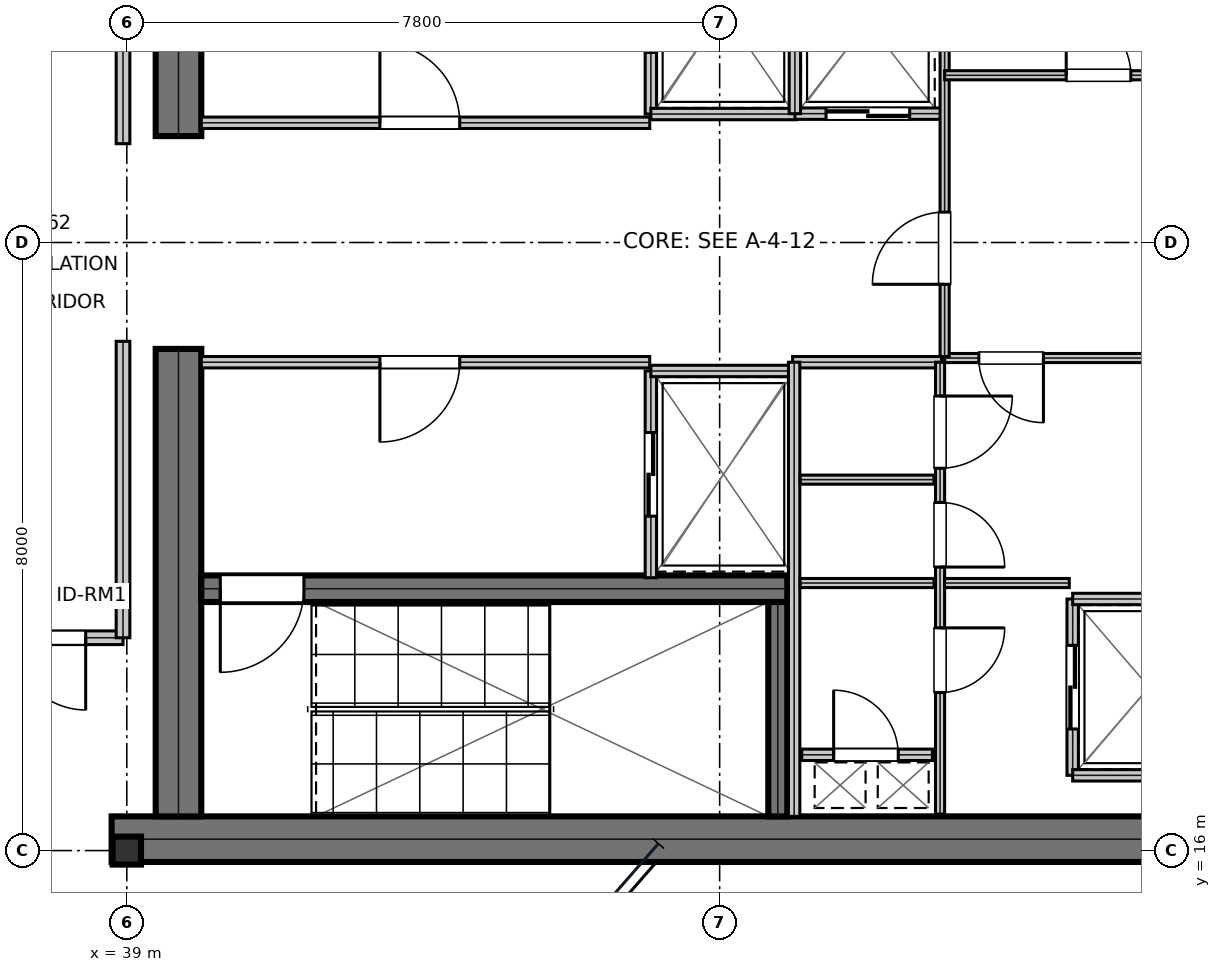
"""IFC4 building model, lengths in metres.
Left out: names, types, materials, properties, quantities, classifications, styles, units other than length and angle.
Written with IfcOpenShell. Run it as: python <this file> out.ifc"""

import sys

from ifc_helpers import new_model, si_unit, direction, frame, frame_2d, origin, origin_2d, place, context, subcontext, project, spatial, rectangle, i_section, extrude, element, fill, save


model = new_model("IFC4")
c1 = context("Model", 3, precision=1e-05, world=origin(), true_north=direction((0.0, 1.0)))
c2 = subcontext(c1, "Body", "Model", "MODEL_VIEW")
j1 = project(units=[si_unit("LENGTHUNIT", "METRE"), si_unit("PLANEANGLEUNIT", "RADIAN")], contexts=[c1])
p1 = place(None, origin())
s1 = spatial("IfcSite", under=j1, at=p1, CompositionType="ELEMENT")
p2 = place(p1, origin())
s2 = spatial("IfcBuilding", under=s1, at=p2, CompositionType="ELEMENT")
p3 = place(p2, frame((0.0, 0.0, 266.85)))
s3 = spatial("IfcBuildingStorey", under=s2, at=p3, CompositionType="ELEMENT", Elevation=266.85)
p4 = place(p3, frame((38.8, 16.15, 0.0), z_axis=(0.0, 0.0, 1.0), x_axis=(1.0, 0.0, 0.0)))
e1 = element("IfcWall", 1, at=p4, inside=s3, PredefinedType="SHEAR", context=c2, shape_type="SweptSolid", body=[
    extrude(rectangle(XDim=16.0, YDim=0.6, at=frame_2d((8.0, 0.0))), origin(), (0.0, 0.0, 1.0), 3.81),
])
for number, where, z_axis, x_axis in (
    (2, (39.68, 16.45, 0.0), (0.0, 0.0, 1.0), (0.0, 1.0, 0.0)),
    (3, (39.68, 25.4, 0.0), (0.0, 0.0, 1.0), (0.0, 1.0, 0.0)),
):
    element("IfcWall", number, at=place(p3, frame(where, z_axis=z_axis, x_axis=x_axis)), inside=s3, PredefinedType="SHEAR", context=c2, shape_type="SweptSolid", body=[
        extrude(rectangle(XDim=6.15, YDim=0.6, at=frame_2d((3.075, 0.0))), origin(), (0.0, 0.0, 1.0), 3.81),
    ])
p5 = place(p3, frame((39.98, 19.445, 0.0), z_axis=(0.0, 0.0, 1.0), x_axis=(1.0, 0.0, 0.0)))
e4 = element("IfcWall", 4, at=p5, inside=s3, PredefinedType="SHEAR", context=c2, shape_type="SweptSolid", body=[
    extrude(rectangle(XDim=7.71, YDim=0.35, at=frame_2d((3.855, 0.0))), origin(), (0.0, 0.0, 1.0), 3.81),
])
p6 = place(p5, frame((0.25, 0.0, 0.0)))
e5 = element("IfcOpeningElement", 5, at=p6, cuts=e4, PredefinedType="OPENING", context=c2, shape_type="SweptSolid", body=[
    extrude(rectangle(XDim=1.1, YDim=2.15, at=frame_2d((0.55, 1.075))), frame((0.0, 0.185, 0.0), z_axis=(0.0, -1.0, 0.0), x_axis=(1.0, 0.0, 0.0)), (0.0, 0.0, 1.0), 0.37),
])
p7 = place(p3, frame((47.565, 16.45, 0.0), z_axis=(0.0, 0.0, 1.0), x_axis=(0.0, 1.0, 0.0)))
e6 = element("IfcWall", 6, at=p7, inside=s3, PredefinedType="SHEAR", context=c2, shape_type="SweptSolid", body=[
    extrude(rectangle(XDim=2.82, YDim=0.25, at=frame_2d((1.41, 0.0))), origin(), (0.0, 0.0, 1.0), 3.81),
])
p8 = place(p3, frame((39.0, 16.0, 0.0), z_axis=(0.0, 0.0, 1.0), x_axis=(1.0, 0.0, 0.0)))
e7 = element("IfcColumn", 7, at=p8, inside=s3, PredefinedType="COLUMN", context=c2, shape_type="SweptSolid", body=[
    extrude(i_section(OverallWidth=0.373, OverallDepth=0.368, WebThickness=0.015, FlangeThickness=0.024, at=origin_2d()), origin(), (0.0, 0.0, 1.0), 4.044),
])
p9 = place(p3, frame((39.98, 25.575, 0.0), z_axis=(0.0, 0.0, 1.0), x_axis=(1.0, 0.0, 0.0)))
e8 = element("IfcWall", 8, at=p9, inside=s3, PredefinedType="PARTITIONING", context=c2, shape_type="SweptSolid", body=[
    extrude(rectangle(XDim=5.9, YDim=0.15, at=frame_2d((2.95, 0.0))), origin(), (0.0, 0.0, 1.0), 3.81),
])
p10 = place(p9, frame((2.35, 0.0, 0.0)))
e9 = element("IfcOpeningElement", 9, at=p10, cuts=e8, PredefinedType="OPENING", context=c2, shape_type="SweptSolid", body=[
    extrude(rectangle(XDim=1.05, YDim=2.15, at=frame_2d((0.525, 1.075))), frame((0.0, 0.085, 0.0), z_axis=(0.0, -1.0, 0.0), x_axis=(1.0, 0.0, 0.0)), (0.0, 0.0, 1.0), 0.17),
])
p11 = place(p3, frame((39.98, 22.425, 0.0), z_axis=(0.0, 0.0, 1.0), x_axis=(1.0, 0.0, 0.0)))
e10 = element("IfcWall", 10, at=p11, inside=s3, PredefinedType="PARTITIONING", context=c2, shape_type="SweptSolid", body=[
    extrude(rectangle(XDim=5.9, YDim=0.15, at=frame_2d((2.95, 0.0))), origin(), (0.0, 0.0, 1.0), 3.81),
])
p12 = place(p11, frame((2.35, 0.0, 0.0)))
e11 = element("IfcOpeningElement", 11, at=p12, cuts=e10, PredefinedType="OPENING", context=c2, shape_type="SweptSolid", body=[
    extrude(rectangle(XDim=1.05, YDim=2.15, at=frame_2d((0.525, 1.075))), frame((0.0, 0.085, 0.0), z_axis=(0.0, -1.0, 0.0), x_axis=(1.0, 0.0, 0.0)), (0.0, 0.0, 1.0), 0.17),
])
p13 = place(p3, frame((45.895, 25.69, 0.0), z_axis=(0.0, 0.0, 1.0), x_axis=(0.0, 1.0, 0.0)))
e12 = element("IfcWall", 12, at=p13, inside=s3, PredefinedType="PARTITIONING", context=c2, shape_type="SweptSolid", body=[
    extrude(rectangle(XDim=2.72, YDim=0.15, at=frame_2d((1.36, 0.0))), origin(), (0.0, 0.0, 1.0), 3.81),
])
p14 = place(p13, frame((0.81, 0.0, 0.0)))
e13 = element("IfcOpeningElement", 13, at=p14, cuts=e12, PredefinedType="OPENING", context=c2, shape_type="SweptSolid", body=[
    extrude(rectangle(XDim=1.1, YDim=2.15, at=frame_2d((0.55, 1.075))), frame((0.0, 0.085, 0.0), z_axis=(0.0, -1.0, 0.0), x_axis=(1.0, 0.0, 0.0)), (0.0, 0.0, 1.0), 0.17),
])
p15 = place(p3, frame((45.895, 25.69, 0.0), z_axis=(0.0, 0.0, 1.0), x_axis=(1.0, 0.0, 0.0)))
e14 = element("IfcWall", 14, at=p15, inside=s3, PredefinedType="PARTITIONING", context=c2, shape_type="SweptSolid", body=[
    extrude(rectangle(XDim=1.915, YDim=0.15, at=frame_2d((0.958, 0.0))), origin(), (0.0, 0.0, 1.0), 3.81),
])
p16 = place(p3, frame((45.895, 19.59, 0.0), z_axis=(0.0, 0.0, 1.0), x_axis=(0.0, 1.0, 0.0)))
e15 = element("IfcWall", 15, at=p16, inside=s3, PredefinedType="PARTITIONING", context=c2, shape_type="SweptSolid", body=[
    extrude(rectangle(XDim=2.72, YDim=0.15, at=frame_2d((1.36, 0.0))), origin(), (0.0, 0.0, 1.0), 3.81),
])
p17 = place(p16, frame((0.81, 0.0, 0.0)))
e16 = element("IfcOpeningElement", 16, at=p17, cuts=e15, PredefinedType="OPENING", context=c2, shape_type="SweptSolid", body=[
    extrude(rectangle(XDim=1.1, YDim=2.15, at=frame_2d((0.55, 1.075))), frame((0.0, 0.085, 0.0), z_axis=(0.0, -1.0, 0.0), x_axis=(1.0, 0.0, 0.0)), (0.0, 0.0, 1.0), 0.17),
])
p18 = place(p3, frame((45.895, 22.31, 0.0), z_axis=(0.0, 0.0, 1.0), x_axis=(1.0, 0.0, 0.0)))
e17 = element("IfcWall", 17, at=p18, inside=s3, PredefinedType="PARTITIONING", context=c2, shape_type="SweptSolid", body=[
    extrude(rectangle(XDim=1.915, YDim=0.15, at=frame_2d((0.958, 0.0))), origin(), (0.0, 0.0, 1.0), 3.81),
])
p19 = place(p3, frame((47.79, 25.695, 0.0), z_axis=(0.0, 0.0, 1.0), x_axis=(1.0, 0.0, 0.0)))
e18 = element("IfcWall", 18, at=p19, inside=s3, PredefinedType="PARTITIONING", context=c2, shape_type="SweptSolid", body=[
    extrude(rectangle(XDim=1.92, YDim=0.15, at=frame_2d((0.96, 0.0))), origin(), (0.0, 0.0, 1.0), 3.81),
])
p20 = place(p19, frame((0.41, 0.0, 0.0)))
e19 = element("IfcOpeningElement", 19, at=p20, cuts=e18, PredefinedType="OPENING", context=c2, shape_type="SweptSolid", body=[
    extrude(rectangle(XDim=1.1, YDim=2.15, at=frame_2d((0.55, 1.075))), frame((0.0, 0.085, 0.0), z_axis=(0.0, -1.0, 0.0), x_axis=(1.0, 0.0, 0.0)), (0.0, 0.0, 1.0), 0.17),
])
p21 = place(p3, frame((47.79, 25.695, 0.0), z_axis=(0.0, 0.0, 1.0), x_axis=(0.0, 1.0, 0.0)))
e20 = element("IfcWall", 20, at=p21, inside=s3, PredefinedType="PARTITIONING", context=c2, shape_type="SweptSolid", body=[
    extrude(rectangle(XDim=2.415, YDim=0.15, at=frame_2d((1.208, 0.0))), origin(), (0.0, 0.0, 1.0), 3.81),
])
p22 = place(p3, frame((51.445, 16.99, 0.0), z_axis=(0.0, 0.0, 1.0), x_axis=(0.0, 1.0, 0.0)))
e21 = element("IfcWall", 21, at=p22, inside=s3, PredefinedType="PARTITIONING", context=c2, shape_type="SweptSolid", body=[
    extrude(rectangle(XDim=2.32, YDim=0.15, at=frame_2d((1.16, 0.0))), origin(), (0.0, 0.0, 1.0), 3.81),
])
p23 = place(p22, frame((0.61, 0.0, 0.0)))
e22 = element("IfcOpeningElement", 22, at=p23, cuts=e21, PredefinedType="OPENING", context=c2, shape_type="SweptSolid", body=[
    extrude(rectangle(XDim=1.1, YDim=2.15, at=frame_2d((0.55, 1.075))), frame((0.0, 0.085, 0.0), z_axis=(0.0, -1.0, 0.0), x_axis=(1.0, 0.0, 0.0)), (0.0, 0.0, 1.0), 0.17),
])
for number, where, z_axis, x_axis in (
    (23, (51.445, 16.99, 0.0), (0.0, 0.0, 1.0), (1.0, 0.0, 0.0)),
    (24, (51.445, 19.31, 0.0), (0.0, 0.0, 1.0), (1.0, 0.0, 0.0)),
):
    element("IfcWall", number, at=place(p3, frame(where, z_axis=z_axis, x_axis=x_axis)), inside=s3, PredefinedType="PARTITIONING", context=c2, shape_type="SweptSolid", body=[
        extrude(rectangle(XDim=2.015, YDim=0.15, at=frame_2d((1.007, 0.0))), origin(), (0.0, 0.0, 1.0), 3.81),
    ])
p24 = place(p3, frame((47.88, 17.26, 0.0), z_axis=(0.0, 0.0, 1.0), x_axis=(1.0, 0.0, 0.0)))
e25 = element("IfcWall", 25, at=p24, inside=s3, PredefinedType="PARTITIONING", context=c2, shape_type="SweptSolid", body=[
    extrude(rectangle(XDim=1.72, YDim=0.15, at=frame_2d((0.86, 0.0))), origin(), (0.0, 0.0, 1.0), 3.81),
])
p25 = place(p24, frame((0.42, 0.0, 0.0)))
e26 = element("IfcOpeningElement", 26, at=p25, cuts=e25, PredefinedType="OPENING", context=c2, shape_type="SweptSolid", body=[
    extrude(rectangle(XDim=0.85, YDim=2.15, at=frame_2d((0.425, 1.075))), frame((0.0, 0.085, 0.0), z_axis=(0.0, -1.0, 0.0), x_axis=(1.0, 0.0, 0.0)), (0.0, 0.0, 1.0), 0.17),
])
p26 = place(p3, frame((47.76, 22.425, 0.0), z_axis=(0.0, 0.0, 1.0), x_axis=(1.0, 0.0, 0.0)))
e27 = element("IfcWall", 27, at=p26, inside=s3, PredefinedType="PARTITIONING", context=c2, shape_type="SweptSolid", body=[
    extrude(rectangle(XDim=1.96, YDim=0.15, at=frame_2d((0.98, 0.0))), origin(), (0.0, 0.0, 1.0), 3.81),
])
p27 = place(p3, frame((47.78, 16.45, 0.0), z_axis=(0.0, 0.0, 1.0), x_axis=(0.0, 1.0, 0.0)))
e28 = element("IfcWall", 28, at=p27, inside=s3, PredefinedType="PARTITIONING", context=c2, shape_type="SweptSolid", body=[
    extrude(rectangle(XDim=5.975, YDim=0.15, at=frame_2d((2.988, 0.0))), origin(), (0.0, 0.0, 1.0), 3.81),
])
for number, where, z_axis, x_axis in (
    (29, (47.86, 19.52, 0.0), (0.0, 0.0, 1.0), (1.0, 0.0, 0.0)),
    (30, (47.86, 20.88, 0.0), (0.0, 0.0, 1.0), (1.0, 0.0, 0.0)),
):
    element("IfcWall", number, at=place(p3, frame(where, z_axis=z_axis, x_axis=x_axis)), inside=s3, PredefinedType="PARTITIONING", context=c2, shape_type="SweptSolid", body=[
        extrude(rectangle(XDim=1.76, YDim=0.12, at=frame_2d((0.88, 0.0))), origin(), (0.0, 0.0, 1.0), 3.81),
    ])
p28 = place(p3, frame((49.7, 16.48, 0.0), z_axis=(0.0, 0.0, 1.0), x_axis=(0.0, 1.0, 0.0)))
e31 = element("IfcWall", 31, at=p28, inside=s3, PredefinedType="PARTITIONING", context=c2, shape_type="SweptSolid", body=[
    extrude(rectangle(XDim=5.945, YDim=0.12, at=frame_2d((2.973, 0.0))), origin(), (0.0, 0.0, 1.0), 3.81),
])
p29 = place(p28, frame((1.6, 0.0, 0.0)))
e32 = element("IfcOpeningElement", 32, at=p29, cuts=e31, PredefinedType="OPENING", context=c2, shape_type="SweptSolid", body=[
    extrude(rectangle(XDim=0.85, YDim=2.15, at=frame_2d((0.425, 1.075))), frame((0.0, 0.07, 0.0), z_axis=(0.0, -1.0, 0.0), x_axis=(1.0, 0.0, 0.0)), (0.0, 0.0, 1.0), 0.14),
])
p30 = place(p28, frame((3.25, 0.0, 0.0)))
e33 = element("IfcOpeningElement", 33, at=p30, cuts=e31, PredefinedType="OPENING", context=c2, shape_type="SweptSolid", body=[
    extrude(rectangle(XDim=0.85, YDim=2.15, at=frame_2d((0.425, 1.075))), frame((0.0, 0.07, 0.0), z_axis=(0.0, -1.0, 0.0), x_axis=(1.0, 0.0, 0.0)), (0.0, 0.0, 1.0), 0.14),
])
p31 = place(p28, frame((4.55, 0.0, 0.0)))
e34 = element("IfcOpeningElement", 34, at=p31, cuts=e31, PredefinedType="OPENING", context=c2, shape_type="SweptSolid", body=[
    extrude(rectangle(XDim=0.95, YDim=2.15, at=frame_2d((0.475, 1.075))), frame((0.0, 0.07, 0.0), z_axis=(0.0, -1.0, 0.0), x_axis=(1.0, 0.0, 0.0)), (0.0, 0.0, 1.0), 0.14),
])
p32 = place(p3, frame((49.76, 22.48, 0.0), z_axis=(0.0, 0.0, 1.0), x_axis=(1.0, 0.0, 0.0)))
e35 = element("IfcWall", 35, at=p32, inside=s3, PredefinedType="PARTITIONING", context=c2, shape_type="SweptSolid", body=[
    extrude(rectangle(XDim=3.9, YDim=0.12, at=frame_2d((1.95, 0.0))), origin(), (0.0, 0.0, 1.0), 3.81),
])
p33 = place(p32, frame((0.45, 0.0, 0.0)))
e36 = element("IfcOpeningElement", 36, at=p33, cuts=e35, PredefinedType="OPENING", context=c2, shape_type="SweptSolid", body=[
    extrude(rectangle(XDim=0.85, YDim=2.15, at=frame_2d((0.425, 1.075))), frame((0.0, 0.07, 0.0), z_axis=(0.0, -1.0, 0.0), x_axis=(1.0, 0.0, 0.0)), (0.0, 0.0, 1.0), 0.14),
])
p34 = place(p3, frame((49.76, 19.52, 0.0), z_axis=(0.0, 0.0, 1.0), x_axis=(1.0, 0.0, 0.0)))
e37 = element("IfcWall", 37, at=p34, inside=s3, PredefinedType="PARTITIONING", context=c2, shape_type="SweptSolid", body=[
    extrude(rectangle(XDim=1.64, YDim=0.12, at=frame_2d((0.82, 0.0))), origin(), (0.0, 0.0, 1.0), 3.81),
])
p35 = place(p3, frame((49.76, 22.5, 0.0), z_axis=(0.0, 0.0, 1.0), x_axis=(0.0, 1.0, 0.0)))
e38 = element("IfcWall", 38, at=p35, inside=s3, PredefinedType="PARTITIONING", context=c2, shape_type="SweptSolid", body=[
    extrude(rectangle(XDim=5.72, YDim=0.12, at=frame_2d((2.86, 0.0))), origin(), (0.0, 0.0, 1.0), 3.81),
])
p36 = place(p35, frame((0.95, 0.0, 0.0)))
e39 = element("IfcOpeningElement", 39, at=p36, cuts=e38, PredefinedType="OPENING", context=c2, shape_type="SweptSolid", body=[
    extrude(rectangle(XDim=0.95, YDim=2.15, at=frame_2d((0.475, 1.075))), frame((0.0, 0.07, 0.0), z_axis=(0.0, -1.0, 0.0), x_axis=(1.0, 0.0, 0.0)), (0.0, 0.0, 1.0), 0.14),
])
p37 = place(p3, frame((49.76, 26.2, 0.0), z_axis=(0.0, 0.0, 1.0), x_axis=(1.0, 0.0, 0.0)))
e40 = element("IfcWall", 40, at=p37, inside=s3, PredefinedType="PARTITIONING", context=c2, shape_type="SweptSolid", body=[
    extrude(rectangle(XDim=3.9, YDim=0.12, at=frame_2d((1.95, 0.0))), origin(), (0.0, 0.0, 1.0), 3.81),
])
p38 = place(p37, frame((1.6, 0.0, 0.0)))
e41 = element("IfcOpeningElement", 41, at=p38, cuts=e40, PredefinedType="OPENING", context=c2, shape_type="SweptSolid", body=[
    extrude(rectangle(XDim=0.85, YDim=2.15, at=frame_2d((0.425, 1.075))), frame((0.0, 0.07, 0.0), z_axis=(0.0, -1.0, 0.0), x_axis=(1.0, 0.0, 0.0)), (0.0, 0.0, 1.0), 0.14),
])
p39 = place(p3, frame((35.938, 18.8, 0.0), z_axis=(0.0, 0.0, 1.0), x_axis=(1.0, 0.0, 0.0)))
e42 = element("IfcWall", 42, at=p39, inside=s3, PredefinedType="SOLIDWALL", context=c2, shape_type="SweptSolid", body=[
    extrude(rectangle(XDim=3.012, YDim=0.18, at=frame_2d((1.506, 0.0))), origin(), (0.0, 0.0, 1.0), 3.81),
])
p40 = place(p39, frame((1.571, 0.0, 0.0)))
e43 = element("IfcOpeningElement", 43, at=p40, cuts=e42, PredefinedType="OPENING", context=c2, shape_type="SweptSolid", body=[
    extrude(rectangle(XDim=0.95, YDim=2.15, at=frame_2d((0.475, 1.075))), frame((0.0, 0.1, 0.0), z_axis=(0.0, -1.0, 0.0), x_axis=(1.0, 0.0, 0.0)), (0.0, 0.0, 1.0), 0.2),
])
p41 = place(p3, frame((38.95, 18.8, 0.0), z_axis=(0.0, 0.0, 1.0), x_axis=(0.0, 1.0, 0.0)))
e44 = element("IfcWall", 44, at=p41, inside=s3, PredefinedType="SOLIDWALL", context=c2, shape_type="SweptSolid", body=[
    extrude(rectangle(XDim=3.9, YDim=0.18, at=frame_2d((1.95, 0.0))), origin(), (0.0, 0.0, 1.0), 3.54),
])
p42 = place(p3, frame((38.95, 25.3, 0.0), z_axis=(0.0, 0.0, 1.0), x_axis=(0.0, 1.0, 0.0)))
e45 = element("IfcWall", 45, at=p42, inside=s3, PredefinedType="SOLIDWALL", context=c2, shape_type="SweptSolid", body=[
    extrude(rectangle(XDim=3.5, YDim=0.18, at=frame_2d((1.75, 0.0))), origin(), (0.0, 0.0, 1.0), 3.54),
])
p43 = place(p10, origin())
e46 = element("IfcDoor", 46, at=p43, inside=s3, OperationType="SINGLE_SWING_LEFT", PredefinedType="DOOR", context=c2, shape_type="SweptSolid", body=[
    extrude(rectangle(XDim=1.05, YDim=2.15, at=frame_2d((0.525, 1.075))), frame((0.0, 0.025, 0.0), z_axis=(0.0, -1.0, 0.0), x_axis=(1.0, 0.0, 0.0)), (0.0, 0.0, 1.0), 0.05),
])
fill(e9, e46)
p44 = place(p12, frame((1.05, 0.0, 0.0), z_axis=(0.0, 0.0, 1.0), x_axis=(-1.0, 0.0, 0.0)))
e47 = element("IfcDoor", 47, at=p44, inside=s3, OperationType="SINGLE_SWING_RIGHT", PredefinedType="DOOR", context=c2, shape_type="SweptSolid", body=[
    extrude(rectangle(XDim=1.05, YDim=2.15, at=frame_2d((0.525, 1.075))), frame((0.0, 0.025, 0.0), z_axis=(0.0, -1.0, 0.0), x_axis=(1.0, 0.0, 0.0)), (0.0, 0.0, 1.0), 0.05),
])
fill(e11, e47)
p45 = place(p17, frame((1.1, 0.0, 0.0), z_axis=(0.0, 0.0, 1.0), x_axis=(-1.0, 0.0, 0.0)))
e48 = element("IfcDoor", 48, at=p45, inside=s3, OperationType="DOUBLE_DOOR_SLIDING", PredefinedType="DOOR", context=c2, shape_type="SweptSolid", body=[
    extrude(rectangle(XDim=1.1, YDim=2.15, at=frame_2d((0.55, 1.075))), frame((0.0, 0.025, 0.0), z_axis=(0.0, -1.0, 0.0), x_axis=(1.0, 0.0, 0.0)), (0.0, 0.0, 1.0), 0.05),
])
fill(e16, e48)
p46 = place(p20, frame((1.1, 0.0, 0.0), z_axis=(0.0, 0.0, 1.0), x_axis=(-1.0, 0.0, 0.0)))
e49 = element("IfcDoor", 49, at=p46, inside=s3, OperationType="DOUBLE_DOOR_SLIDING", PredefinedType="DOOR", context=c2, shape_type="SweptSolid", body=[
    extrude(rectangle(XDim=1.1, YDim=2.15, at=frame_2d((0.55, 1.075))), frame((0.0, 0.025, 0.0), z_axis=(0.0, -1.0, 0.0), x_axis=(1.0, 0.0, 0.0)), (0.0, 0.0, 1.0), 0.05),
])
fill(e19, e49)
p47 = place(p23, frame((1.1, 0.0, 0.0), z_axis=(0.0, 0.0, 1.0), x_axis=(-1.0, 0.0, 0.0)))
e50 = element("IfcDoor", 50, at=p47, inside=s3, OperationType="DOUBLE_DOOR_SLIDING", PredefinedType="DOOR", context=c2, shape_type="SweptSolid", body=[
    extrude(rectangle(XDim=1.1, YDim=2.15, at=frame_2d((0.55, 1.075))), frame((0.0, 0.025, 0.0), z_axis=(0.0, -1.0, 0.0), x_axis=(1.0, 0.0, 0.0)), (0.0, 0.0, 1.0), 0.05),
])
fill(e22, e50)
p48 = place(p25, origin())
e51 = element("IfcDoor", 51, at=p48, inside=s3, OperationType="SINGLE_SWING_LEFT", PredefinedType="TRAPDOOR", context=c2, shape_type="SweptSolid", body=[
    extrude(rectangle(XDim=0.85, YDim=2.15, at=frame_2d((0.425, 1.075))), frame((0.0, 0.025, 0.0), z_axis=(0.0, -1.0, 0.0), x_axis=(1.0, 0.0, 0.0)), (0.0, 0.0, 1.0), 0.05),
])
fill(e26, e51)
p49 = place(p29, frame((0.85, 0.0, 0.0), z_axis=(0.0, 0.0, 1.0), x_axis=(-1.0, 0.0, 0.0)))
e52 = element("IfcDoor", 52, at=p49, inside=s3, OperationType="SINGLE_SWING_LEFT", PredefinedType="DOOR", context=c2, shape_type="SweptSolid", body=[
    extrude(rectangle(XDim=0.85, YDim=2.15, at=frame_2d((0.425, 1.075))), frame((0.0, 0.025, 0.0), z_axis=(0.0, -1.0, 0.0), x_axis=(1.0, 0.0, 0.0)), (0.0, 0.0, 1.0), 0.05),
])
fill(e32, e52)
p50 = place(p30, frame((0.85, 0.0, 0.0), z_axis=(0.0, 0.0, 1.0), x_axis=(-1.0, 0.0, 0.0)))
e53 = element("IfcDoor", 53, at=p50, inside=s3, OperationType="SINGLE_SWING_RIGHT", PredefinedType="DOOR", context=c2, shape_type="SweptSolid", body=[
    extrude(rectangle(XDim=0.85, YDim=2.15, at=frame_2d((0.425, 1.075))), frame((0.0, 0.025, 0.0), z_axis=(0.0, -1.0, 0.0), x_axis=(1.0, 0.0, 0.0)), (0.0, 0.0, 1.0), 0.05),
])
fill(e33, e53)
p51 = place(p31, frame((0.95, 0.0, 0.0), z_axis=(0.0, 0.0, 1.0), x_axis=(-1.0, 0.0, 0.0)))
e54 = element("IfcDoor", 54, at=p51, inside=s3, OperationType="SINGLE_SWING_LEFT", PredefinedType="DOOR", context=c2, shape_type="SweptSolid", body=[
    extrude(rectangle(XDim=0.95, YDim=2.15, at=frame_2d((0.475, 1.075))), frame((0.0, 0.025, 0.0), z_axis=(0.0, -1.0, 0.0), x_axis=(1.0, 0.0, 0.0)), (0.0, 0.0, 1.0), 0.05),
])
fill(e34, e54)
p52 = place(p33, frame((0.85, 0.0, 0.0), z_axis=(0.0, 0.0, 1.0), x_axis=(-1.0, 0.0, 0.0)))
e55 = element("IfcDoor", 55, at=p52, inside=s3, OperationType="SINGLE_SWING_LEFT", PredefinedType="DOOR", context=c2, shape_type="SweptSolid", body=[
    extrude(rectangle(XDim=0.85, YDim=2.15, at=frame_2d((0.425, 1.075))), frame((0.0, 0.025, 0.0), z_axis=(0.0, -1.0, 0.0), x_axis=(1.0, 0.0, 0.0)), (0.0, 0.0, 1.0), 0.05),
])
fill(e36, e55)
p53 = place(p36, origin())
e56 = element("IfcDoor", 56, at=p53, inside=s3, OperationType="SINGLE_SWING_LEFT", PredefinedType="DOOR", context=c2, shape_type="SweptSolid", body=[
    extrude(rectangle(XDim=0.95, YDim=2.15, at=frame_2d((0.475, 1.075))), frame((0.0, 0.025, 0.0), z_axis=(0.0, -1.0, 0.0), x_axis=(1.0, 0.0, 0.0)), (0.0, 0.0, 1.0), 0.05),
])
fill(e39, e56)
p54 = place(p38, origin())
e57 = element("IfcDoor", 57, at=p54, inside=s3, OperationType="SINGLE_SWING_LEFT", PredefinedType="DOOR", context=c2, shape_type="SweptSolid", body=[
    extrude(rectangle(XDim=0.85, YDim=2.15, at=frame_2d((0.425, 1.075))), frame((0.0, 0.025, 0.0), z_axis=(0.0, -1.0, 0.0), x_axis=(1.0, 0.0, 0.0)), (0.0, 0.0, 1.0), 0.05),
])
fill(e41, e57)
p55 = place(p40, frame((0.95, 0.0, 0.0), z_axis=(0.0, 0.0, 1.0), x_axis=(-1.0, 0.0, 0.0)))
e58 = element("IfcDoor", 58, at=p55, inside=s3, OperationType="SINGLE_SWING_LEFT", PredefinedType="DOOR", context=c2, shape_type="SweptSolid", body=[
    extrude(rectangle(XDim=0.95, YDim=2.15, at=frame_2d((0.475, 1.075))), frame((0.0, 0.025, 0.0), z_axis=(0.0, -1.0, 0.0), x_axis=(1.0, 0.0, 0.0)), (0.0, 0.0, 1.0), 0.05),
])
fill(e43, e58)
p56 = place(p6, frame((1.1, 0.0, 0.0), z_axis=(0.0, 0.0, 1.0), x_axis=(-1.0, 0.0, 0.0)))
e59 = element("IfcDoor", 59, at=p56, inside=s3, OperationType="SINGLE_SWING_RIGHT", PredefinedType="DOOR", context=c2, shape_type="SweptSolid", body=[
    extrude(rectangle(XDim=1.1, YDim=2.15, at=frame_2d((0.55, 1.075))), frame((0.0, 0.025, 0.0), z_axis=(0.0, -1.0, 0.0), x_axis=(1.0, 0.0, 0.0)), (0.0, 0.0, 1.0), 0.05),
])
fill(e5, e59)
save(model, sys.argv[1])
